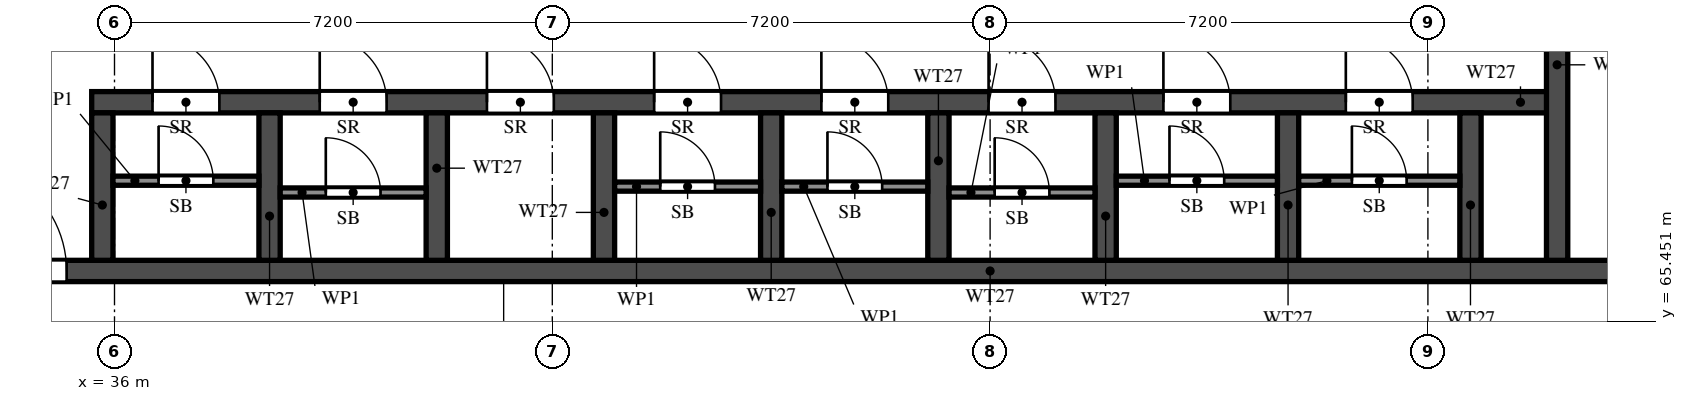
"""IFC4 building model, lengths in metres.
Left out: names, types, materials, properties, quantities, classifications, styles, units other than length and angle.
Written with IfcOpenShell. Run it as: python <this file> out.ifc"""

import sys

from ifc_helpers import new_model, si_unit, direction, frame, frame_2d, origin, place, context, subcontext, project, spatial, rectangle, extrude, element, fill, save


model = new_model("IFC4")
c1 = context("Model", 3, precision=1e-05, world=origin(), true_north=direction((0.0, 1.0)))
c2 = subcontext(c1, "Body", "Model", "MODEL_VIEW")
j1 = project(units=[si_unit("LENGTHUNIT", "METRE"), si_unit("PLANEANGLEUNIT", "RADIAN")], contexts=[c1])
p1 = place(None, origin())
s1 = spatial("IfcSite", under=j1, at=p1, CompositionType="ELEMENT")
p2 = place(p1, origin())
s2 = spatial("IfcBuilding", under=s1, at=p2, CompositionType="ELEMENT")
p3 = place(p2, frame((0.0, 0.0, 143.0)))
s3 = spatial("IfcBuildingStorey", under=s2, at=p3, CompositionType="ELEMENT", Elevation=143.0)
p4 = place(p3, frame((29.7, 66.275, 0.0), z_axis=(0.0, 0.0, 1.0), x_axis=(1.0, 0.0, 0.0)))
e1 = element("IfcWall", 1, at=p4, inside=s3, PredefinedType="SHEAR", context=c2, shape_type="SweptSolid", body=[
    extrude(rectangle(XDim=41.4, YDim=0.35, at=frame_2d((20.7, 0.0))), origin(), (0.0, 0.0, 1.0), 3.2),
])
p5 = place(p4, frame((0.925, 0.0, 0.0)))
e2 = element("IfcOpeningElement", 2, at=p5, cuts=e1, PredefinedType="OPENING", context=c2, shape_type="SweptSolid", body=[
    extrude(rectangle(XDim=1.1, YDim=2.1, at=frame_2d((0.55, 1.05))), frame((0.0, 0.185, 0.0), z_axis=(0.0, -1.0, 0.0), x_axis=(1.0, 0.0, 0.0)), (0.0, 0.0, 1.0), 0.37),
])
p6 = place(p4, frame((3.712, 0.0, 0.0)))
e3 = element("IfcOpeningElement", 3, at=p6, cuts=e1, PredefinedType="OPENING", context=c2, shape_type="SweptSolid", body=[
    extrude(rectangle(XDim=1.8, YDim=2.1, at=frame_2d((0.9, 1.05))), frame((0.0, 0.185, 0.0), z_axis=(0.0, -1.0, 0.0), x_axis=(1.0, 0.0, 0.0)), (0.0, 0.0, 1.0), 0.37),
])
p7 = place(p3, frame((35.625, 69.05, 0.0), z_axis=(0.0, 0.0, 1.0), x_axis=(1.0, 0.0, 0.0)))
e4 = element("IfcWall", 4, at=p7, inside=s3, PredefinedType="SHEAR", context=c2, shape_type="SweptSolid", body=[
    extrude(rectangle(XDim=24.1, YDim=0.35, at=frame_2d((12.05, 0.0))), origin(), (0.0, 0.0, 1.0), 3.2),
])
p8 = place(p7, frame((1.0, 0.0, 0.0)))
e5 = element("IfcOpeningElement", 5, at=p8, cuts=e4, PredefinedType="OPENING", context=c2, shape_type="SweptSolid", body=[
    extrude(rectangle(XDim=1.1, YDim=2.1, at=frame_2d((0.55, 1.05))), frame((0.0, 0.185, 0.0), z_axis=(0.0, -1.0, 0.0), x_axis=(1.0, 0.0, 0.0)), (0.0, 0.0, 1.0), 0.37),
])
p9 = place(p7, frame((3.75, 0.0, 0.0)))
e6 = element("IfcOpeningElement", 6, at=p9, cuts=e4, PredefinedType="OPENING", context=c2, shape_type="SweptSolid", body=[
    extrude(rectangle(XDim=1.1, YDim=2.1, at=frame_2d((0.55, 1.05))), frame((0.0, 0.185, 0.0), z_axis=(0.0, -1.0, 0.0), x_axis=(1.0, 0.0, 0.0)), (0.0, 0.0, 1.0), 0.37),
])
p10 = place(p7, frame((6.5, 0.0, 0.0)))
e7 = element("IfcOpeningElement", 7, at=p10, cuts=e4, PredefinedType="OPENING", context=c2, shape_type="SweptSolid", body=[
    extrude(rectangle(XDim=1.1, YDim=2.1, at=frame_2d((0.55, 1.05))), frame((0.0, 0.185, 0.0), z_axis=(0.0, -1.0, 0.0), x_axis=(1.0, 0.0, 0.0)), (0.0, 0.0, 1.0), 0.37),
])
p11 = place(p7, frame((9.25, 0.0, 0.0)))
e8 = element("IfcOpeningElement", 8, at=p11, cuts=e4, PredefinedType="OPENING", context=c2, shape_type="SweptSolid", body=[
    extrude(rectangle(XDim=1.1, YDim=2.1, at=frame_2d((0.55, 1.05))), frame((0.0, 0.185, 0.0), z_axis=(0.0, -1.0, 0.0), x_axis=(1.0, 0.0, 0.0)), (0.0, 0.0, 1.0), 0.37),
])
p12 = place(p7, frame((12.0, 0.0, 0.0)))
e9 = element("IfcOpeningElement", 9, at=p12, cuts=e4, PredefinedType="OPENING", context=c2, shape_type="SweptSolid", body=[
    extrude(rectangle(XDim=1.1, YDim=2.1, at=frame_2d((0.55, 1.05))), frame((0.0, 0.185, 0.0), z_axis=(0.0, -1.0, 0.0), x_axis=(1.0, 0.0, 0.0)), (0.0, 0.0, 1.0), 0.37),
])
p13 = place(p7, frame((14.75, 0.0, 0.0)))
e10 = element("IfcOpeningElement", 10, at=p13, cuts=e4, PredefinedType="OPENING", context=c2, shape_type="SweptSolid", body=[
    extrude(rectangle(XDim=1.1, YDim=2.1, at=frame_2d((0.55, 1.05))), frame((0.0, 0.185, 0.0), z_axis=(0.0, -1.0, 0.0), x_axis=(1.0, 0.0, 0.0)), (0.0, 0.0, 1.0), 0.37),
])
p14 = place(p7, frame((17.625, 0.0, 0.0)))
e11 = element("IfcOpeningElement", 11, at=p14, cuts=e4, PredefinedType="OPENING", context=c2, shape_type="SweptSolid", body=[
    extrude(rectangle(XDim=1.1, YDim=2.1, at=frame_2d((0.55, 1.05))), frame((0.0, 0.185, 0.0), z_axis=(0.0, -1.0, 0.0), x_axis=(1.0, 0.0, 0.0)), (0.0, 0.0, 1.0), 0.37),
])
p15 = place(p7, frame((20.625, 0.0, 0.0)))
e12 = element("IfcOpeningElement", 12, at=p15, cuts=e4, PredefinedType="OPENING", context=c2, shape_type="SweptSolid", body=[
    extrude(rectangle(XDim=1.1, YDim=2.1, at=frame_2d((0.55, 1.05))), frame((0.0, 0.185, 0.0), z_axis=(0.0, -1.0, 0.0), x_axis=(1.0, 0.0, 0.0)), (0.0, 0.0, 1.0), 0.37),
])
p16 = place(p3, frame((59.725, 66.45, 0.0), z_axis=(0.0, 0.0, 1.0), x_axis=(0.0, 1.0, 0.0)))
e13 = element("IfcWall", 13, at=p16, inside=s3, PredefinedType="SHEAR", context=c2, shape_type="SweptSolid", body=[
    extrude(rectangle(XDim=6.125, YDim=0.35, at=frame_2d((3.062, 0.0))), origin(), (0.0, 0.0, 1.0), 3.2),
])
p17 = place(p16, frame((3.85, 0.0, 0.0)))
e14 = element("IfcOpeningElement", 14, at=p17, cuts=e13, PredefinedType="OPENING", context=c2, shape_type="SweptSolid", body=[
    extrude(rectangle(XDim=1.2, YDim=2.1, at=frame_2d((0.6, 1.05))), frame((0.0, 0.185, 0.0), z_axis=(0.0, -1.0, 0.0), x_axis=(1.0, 0.0, 0.0)), (0.0, 0.0, 1.0), 0.37),
])
for number, where, z_axis, x_axis in (
    (15, (35.8, 66.45, 0.0), (0.0, 0.0, 1.0), (0.0, 1.0, 0.0)),
    (16, (38.55, 66.45, 0.0), (0.0, 0.0, 1.0), (0.0, 1.0, 0.0)),
    (17, (41.3, 66.45, 0.0), (0.0, 0.0, 1.0), (0.0, 1.0, 0.0)),
    (18, (44.05, 66.45, 0.0), (0.0, 0.0, 1.0), (0.0, 1.0, 0.0)),
    (19, (46.8, 66.45, 0.0), (0.0, 0.0, 1.0), (0.0, 1.0, 0.0)),
    (20, (49.55, 66.45, 0.0), (0.0, 0.0, 1.0), (0.0, 1.0, 0.0)),
    (21, (52.3, 66.45, 0.0), (0.0, 0.0, 1.0), (0.0, 1.0, 0.0)),
    (22, (55.3, 66.45, 0.0), (0.0, 0.0, 1.0), (0.0, 1.0, 0.0)),
    (23, (58.3, 66.45, 0.0), (0.0, 0.0, 1.0), (0.0, 1.0, 0.0)),
):
    element("IfcWall", number, at=place(p3, frame(where, z_axis=z_axis, x_axis=x_axis)), inside=s3, PredefinedType="SHEAR", context=c2, shape_type="SweptSolid", body=[
        extrude(rectangle(XDim=2.425, YDim=0.35, at=frame_2d((1.212, 0.0))), origin(), (0.0, 0.0, 1.0), 3.2),
    ])
p18 = place(p3, frame((35.975, 67.76, 0.0), z_axis=(0.0, 0.0, 1.0), x_axis=(1.0, 0.0, 0.0)))
e24 = element("IfcWall", 24, at=p18, inside=s3, PredefinedType="PARTITIONING", context=c2, shape_type="SweptSolid", body=[
    extrude(rectangle(XDim=2.4, YDim=0.15, at=frame_2d((1.2, 0.0))), origin(), (0.0, 0.0, 1.0), 3.2),
])
p19 = place(p18, frame((0.75, 0.0, 0.0)))
e25 = element("IfcOpeningElement", 25, at=p19, cuts=e24, PredefinedType="OPENING", context=c2, shape_type="SweptSolid", body=[
    extrude(rectangle(XDim=0.9, YDim=2.1, at=frame_2d((0.45, 1.05))), frame((0.0, 0.085, 0.0), z_axis=(0.0, -1.0, 0.0), x_axis=(1.0, 0.0, 0.0)), (0.0, 0.0, 1.0), 0.17),
])
p20 = place(p3, frame((38.725, 67.565, 0.0), z_axis=(0.0, 0.0, 1.0), x_axis=(1.0, 0.0, 0.0)))
e26 = element("IfcWall", 26, at=p20, inside=s3, PredefinedType="PARTITIONING", context=c2, shape_type="SweptSolid", body=[
    extrude(rectangle(XDim=2.4, YDim=0.15, at=frame_2d((1.2, 0.0))), origin(), (0.0, 0.0, 1.0), 3.2),
])
p21 = place(p20, frame((0.75, 0.0, 0.0)))
e27 = element("IfcOpeningElement", 27, at=p21, cuts=e26, PredefinedType="OPENING", context=c2, shape_type="SweptSolid", body=[
    extrude(rectangle(XDim=0.9, YDim=2.1, at=frame_2d((0.45, 1.05))), frame((0.0, 0.085, 0.0), z_axis=(0.0, -1.0, 0.0), x_axis=(1.0, 0.0, 0.0)), (0.0, 0.0, 1.0), 0.17),
])
p22 = place(p3, frame((44.225, 67.663, 0.0), z_axis=(0.0, 0.0, 1.0), x_axis=(1.0, 0.0, 0.0)))
e28 = element("IfcWall", 28, at=p22, inside=s3, PredefinedType="PARTITIONING", context=c2, shape_type="SweptSolid", body=[
    extrude(rectangle(XDim=2.4, YDim=0.15, at=frame_2d((1.2, 0.0))), origin(), (0.0, 0.0, 1.0), 3.2),
])
p23 = place(p22, frame((0.75, 0.0, 0.0)))
e29 = element("IfcOpeningElement", 29, at=p23, cuts=e28, PredefinedType="OPENING", context=c2, shape_type="SweptSolid", body=[
    extrude(rectangle(XDim=0.9, YDim=2.1, at=frame_2d((0.45, 1.05))), frame((0.0, 0.085, 0.0), z_axis=(0.0, -1.0, 0.0), x_axis=(1.0, 0.0, 0.0)), (0.0, 0.0, 1.0), 0.17),
])
p24 = place(p3, frame((46.975, 67.663, 0.0), z_axis=(0.0, 0.0, 1.0), x_axis=(1.0, 0.0, 0.0)))
e30 = element("IfcWall", 30, at=p24, inside=s3, PredefinedType="PARTITIONING", context=c2, shape_type="SweptSolid", body=[
    extrude(rectangle(XDim=2.4, YDim=0.15, at=frame_2d((1.2, 0.0))), origin(), (0.0, 0.0, 1.0), 3.2),
])
p25 = place(p24, frame((0.75, 0.0, 0.0)))
e31 = element("IfcOpeningElement", 31, at=p25, cuts=e30, PredefinedType="OPENING", context=c2, shape_type="SweptSolid", body=[
    extrude(rectangle(XDim=0.9, YDim=2.1, at=frame_2d((0.45, 1.05))), frame((0.0, 0.085, 0.0), z_axis=(0.0, -1.0, 0.0), x_axis=(1.0, 0.0, 0.0)), (0.0, 0.0, 1.0), 0.17),
])
p26 = place(p3, frame((49.725, 67.565, 0.0), z_axis=(0.0, 0.0, 1.0), x_axis=(1.0, 0.0, 0.0)))
e32 = element("IfcWall", 32, at=p26, inside=s3, PredefinedType="PARTITIONING", context=c2, shape_type="SweptSolid", body=[
    extrude(rectangle(XDim=2.4, YDim=0.15, at=frame_2d((1.2, 0.0))), origin(), (0.0, 0.0, 1.0), 3.2),
])
p27 = place(p26, frame((0.75, 0.0, 0.0)))
e33 = element("IfcOpeningElement", 33, at=p27, cuts=e32, PredefinedType="OPENING", context=c2, shape_type="SweptSolid", body=[
    extrude(rectangle(XDim=0.9, YDim=2.1, at=frame_2d((0.45, 1.05))), frame((0.0, 0.085, 0.0), z_axis=(0.0, -1.0, 0.0), x_axis=(1.0, 0.0, 0.0)), (0.0, 0.0, 1.0), 0.17),
])
p28 = place(p3, frame((52.475, 67.76, 0.0), z_axis=(0.0, 0.0, 1.0), x_axis=(1.0, 0.0, 0.0)))
e34 = element("IfcWall", 34, at=p28, inside=s3, PredefinedType="PARTITIONING", context=c2, shape_type="SweptSolid", body=[
    extrude(rectangle(XDim=2.65, YDim=0.15, at=frame_2d((1.325, 0.0))), origin(), (0.0, 0.0, 1.0), 3.2),
])
p29 = place(p28, frame((0.875, 0.0, 0.0)))
e35 = element("IfcOpeningElement", 35, at=p29, cuts=e34, PredefinedType="OPENING", context=c2, shape_type="SweptSolid", body=[
    extrude(rectangle(XDim=0.9, YDim=2.1, at=frame_2d((0.45, 1.05))), frame((0.0, 0.085, 0.0), z_axis=(0.0, -1.0, 0.0), x_axis=(1.0, 0.0, 0.0)), (0.0, 0.0, 1.0), 0.17),
])
p30 = place(p3, frame((55.475, 67.76, 0.0), z_axis=(0.0, 0.0, 1.0), x_axis=(1.0, 0.0, 0.0)))
e36 = element("IfcWall", 36, at=p30, inside=s3, PredefinedType="PARTITIONING", context=c2, shape_type="SweptSolid", body=[
    extrude(rectangle(XDim=2.65, YDim=0.15, at=frame_2d((1.325, 0.0))), origin(), (0.0, 0.0, 1.0), 3.2),
])
p31 = place(p30, frame((0.875, 0.0, 0.0)))
e37 = element("IfcOpeningElement", 37, at=p31, cuts=e36, PredefinedType="OPENING", context=c2, shape_type="SweptSolid", body=[
    extrude(rectangle(XDim=0.9, YDim=2.1, at=frame_2d((0.45, 1.05))), frame((0.0, 0.085, 0.0), z_axis=(0.0, -1.0, 0.0), x_axis=(1.0, 0.0, 0.0)), (0.0, 0.0, 1.0), 0.17),
])
p32 = place(p6, origin())
e38 = element("IfcDoor", 38, at=p32, inside=s3, OperationType="DOUBLE_DOOR_SINGLE_SWING", PredefinedType="DOOR", context=c2, shape_type="SweptSolid", body=[
    extrude(rectangle(XDim=1.8, YDim=2.1, at=frame_2d((0.9, 1.05))), frame((0.0, 0.025, 0.0), z_axis=(0.0, -1.0, 0.0), x_axis=(1.0, 0.0, 0.0)), (0.0, 0.0, 1.0), 0.05),
])
fill(e3, e38)
p33 = place(p8, origin())
e39 = element("IfcDoor", 39, at=p33, inside=s3, OperationType="SINGLE_SWING_RIGHT", PredefinedType="DOOR", context=c2, shape_type="SweptSolid", body=[
    extrude(rectangle(XDim=1.1, YDim=2.1, at=frame_2d((0.55, 1.05))), frame((0.0, 0.025, 0.0), z_axis=(0.0, -1.0, 0.0), x_axis=(1.0, 0.0, 0.0)), (0.0, 0.0, 1.0), 0.05),
])
fill(e5, e39)
p34 = place(p19, origin())
e40 = element("IfcDoor", 40, at=p34, inside=s3, OperationType="SINGLE_SWING_LEFT", PredefinedType="DOOR", context=c2, shape_type="SweptSolid", body=[
    extrude(rectangle(XDim=0.9, YDim=2.1, at=frame_2d((0.45, 1.05))), frame((0.0, 0.025, 0.0), z_axis=(0.0, -1.0, 0.0), x_axis=(1.0, 0.0, 0.0)), (0.0, 0.0, 1.0), 0.05),
])
fill(e25, e40)
p35 = place(p9, origin())
e41 = element("IfcDoor", 41, at=p35, inside=s3, OperationType="SINGLE_SWING_LEFT", PredefinedType="DOOR", context=c2, shape_type="SweptSolid", body=[
    extrude(rectangle(XDim=1.1, YDim=2.1, at=frame_2d((0.55, 1.05))), frame((0.0, 0.025, 0.0), z_axis=(0.0, -1.0, 0.0), x_axis=(1.0, 0.0, 0.0)), (0.0, 0.0, 1.0), 0.05),
])
fill(e6, e41)
p36 = place(p21, origin())
e42 = element("IfcDoor", 42, at=p36, inside=s3, OperationType="SINGLE_SWING_LEFT", PredefinedType="DOOR", context=c2, shape_type="SweptSolid", body=[
    extrude(rectangle(XDim=0.9, YDim=2.1, at=frame_2d((0.45, 1.05))), frame((0.0, 0.025, 0.0), z_axis=(0.0, -1.0, 0.0), x_axis=(1.0, 0.0, 0.0)), (0.0, 0.0, 1.0), 0.05),
])
fill(e27, e42)
p37 = place(p10, origin())
e43 = element("IfcDoor", 43, at=p37, inside=s3, OperationType="SINGLE_SWING_RIGHT", PredefinedType="DOOR", context=c2, shape_type="SweptSolid", body=[
    extrude(rectangle(XDim=1.1, YDim=2.1, at=frame_2d((0.55, 1.05))), frame((0.0, 0.025, 0.0), z_axis=(0.0, -1.0, 0.0), x_axis=(1.0, 0.0, 0.0)), (0.0, 0.0, 1.0), 0.05),
])
fill(e7, e43)
p38 = place(p11, origin())
e44 = element("IfcDoor", 44, at=p38, inside=s3, OperationType="SINGLE_SWING_LEFT", PredefinedType="DOOR", context=c2, shape_type="SweptSolid", body=[
    extrude(rectangle(XDim=1.1, YDim=2.1, at=frame_2d((0.55, 1.05))), frame((0.0, 0.025, 0.0), z_axis=(0.0, -1.0, 0.0), x_axis=(1.0, 0.0, 0.0)), (0.0, 0.0, 1.0), 0.05),
])
fill(e8, e44)
p39 = place(p23, origin())
e45 = element("IfcDoor", 45, at=p39, inside=s3, OperationType="SINGLE_SWING_LEFT", PredefinedType="DOOR", context=c2, shape_type="SweptSolid", body=[
    extrude(rectangle(XDim=0.9, YDim=2.1, at=frame_2d((0.45, 1.05))), frame((0.0, 0.025, 0.0), z_axis=(0.0, -1.0, 0.0), x_axis=(1.0, 0.0, 0.0)), (0.0, 0.0, 1.0), 0.05),
])
fill(e29, e45)
p40 = place(p12, origin())
e46 = element("IfcDoor", 46, at=p40, inside=s3, OperationType="SINGLE_SWING_RIGHT", PredefinedType="DOOR", context=c2, shape_type="SweptSolid", body=[
    extrude(rectangle(XDim=1.1, YDim=2.1, at=frame_2d((0.55, 1.05))), frame((0.0, 0.025, 0.0), z_axis=(0.0, -1.0, 0.0), x_axis=(1.0, 0.0, 0.0)), (0.0, 0.0, 1.0), 0.05),
])
fill(e9, e46)
p41 = place(p25, origin())
e47 = element("IfcDoor", 47, at=p41, inside=s3, OperationType="SINGLE_SWING_RIGHT", PredefinedType="DOOR", context=c2, shape_type="SweptSolid", body=[
    extrude(rectangle(XDim=0.9, YDim=2.1, at=frame_2d((0.45, 1.05))), frame((0.0, 0.025, 0.0), z_axis=(0.0, -1.0, 0.0), x_axis=(1.0, 0.0, 0.0)), (0.0, 0.0, 1.0), 0.05),
])
fill(e31, e47)
p42 = place(p13, origin())
e48 = element("IfcDoor", 48, at=p42, inside=s3, OperationType="SINGLE_SWING_LEFT", PredefinedType="DOOR", context=c2, shape_type="SweptSolid", body=[
    extrude(rectangle(XDim=1.1, YDim=2.1, at=frame_2d((0.55, 1.05))), frame((0.0, 0.025, 0.0), z_axis=(0.0, -1.0, 0.0), x_axis=(1.0, 0.0, 0.0)), (0.0, 0.0, 1.0), 0.05),
])
fill(e10, e48)
p43 = place(p27, origin())
e49 = element("IfcDoor", 49, at=p43, inside=s3, OperationType="SINGLE_SWING_LEFT", PredefinedType="DOOR", context=c2, shape_type="SweptSolid", body=[
    extrude(rectangle(XDim=0.9, YDim=2.1, at=frame_2d((0.45, 1.05))), frame((0.0, 0.025, 0.0), z_axis=(0.0, -1.0, 0.0), x_axis=(1.0, 0.0, 0.0)), (0.0, 0.0, 1.0), 0.05),
])
fill(e33, e49)
p44 = place(p14, origin())
e50 = element("IfcDoor", 50, at=p44, inside=s3, OperationType="SINGLE_SWING_RIGHT", PredefinedType="DOOR", context=c2, shape_type="SweptSolid", body=[
    extrude(rectangle(XDim=1.1, YDim=2.1, at=frame_2d((0.55, 1.05))), frame((0.0, 0.025, 0.0), z_axis=(0.0, -1.0, 0.0), x_axis=(1.0, 0.0, 0.0)), (0.0, 0.0, 1.0), 0.05),
])
fill(e11, e50)
p45 = place(p29, origin())
e51 = element("IfcDoor", 51, at=p45, inside=s3, OperationType="SINGLE_SWING_LEFT", PredefinedType="DOOR", context=c2, shape_type="SweptSolid", body=[
    extrude(rectangle(XDim=0.9, YDim=2.1, at=frame_2d((0.45, 1.05))), frame((0.0, 0.025, 0.0), z_axis=(0.0, -1.0, 0.0), x_axis=(1.0, 0.0, 0.0)), (0.0, 0.0, 1.0), 0.05),
])
fill(e35, e51)
p46 = place(p15, origin())
e52 = element("IfcDoor", 52, at=p46, inside=s3, OperationType="SINGLE_SWING_RIGHT", PredefinedType="DOOR", context=c2, shape_type="SweptSolid", body=[
    extrude(rectangle(XDim=1.1, YDim=2.1, at=frame_2d((0.55, 1.05))), frame((0.0, 0.025, 0.0), z_axis=(0.0, -1.0, 0.0), x_axis=(1.0, 0.0, 0.0)), (0.0, 0.0, 1.0), 0.05),
])
fill(e12, e52)
p47 = place(p31, origin())
e53 = element("IfcDoor", 53, at=p47, inside=s3, OperationType="SINGLE_SWING_LEFT", PredefinedType="DOOR", context=c2, shape_type="SweptSolid", body=[
    extrude(rectangle(XDim=0.9, YDim=2.1, at=frame_2d((0.45, 1.05))), frame((0.0, 0.025, 0.0), z_axis=(0.0, -1.0, 0.0), x_axis=(1.0, 0.0, 0.0)), (0.0, 0.0, 1.0), 0.05),
])
fill(e37, e53)
save(model, sys.argv[1])
